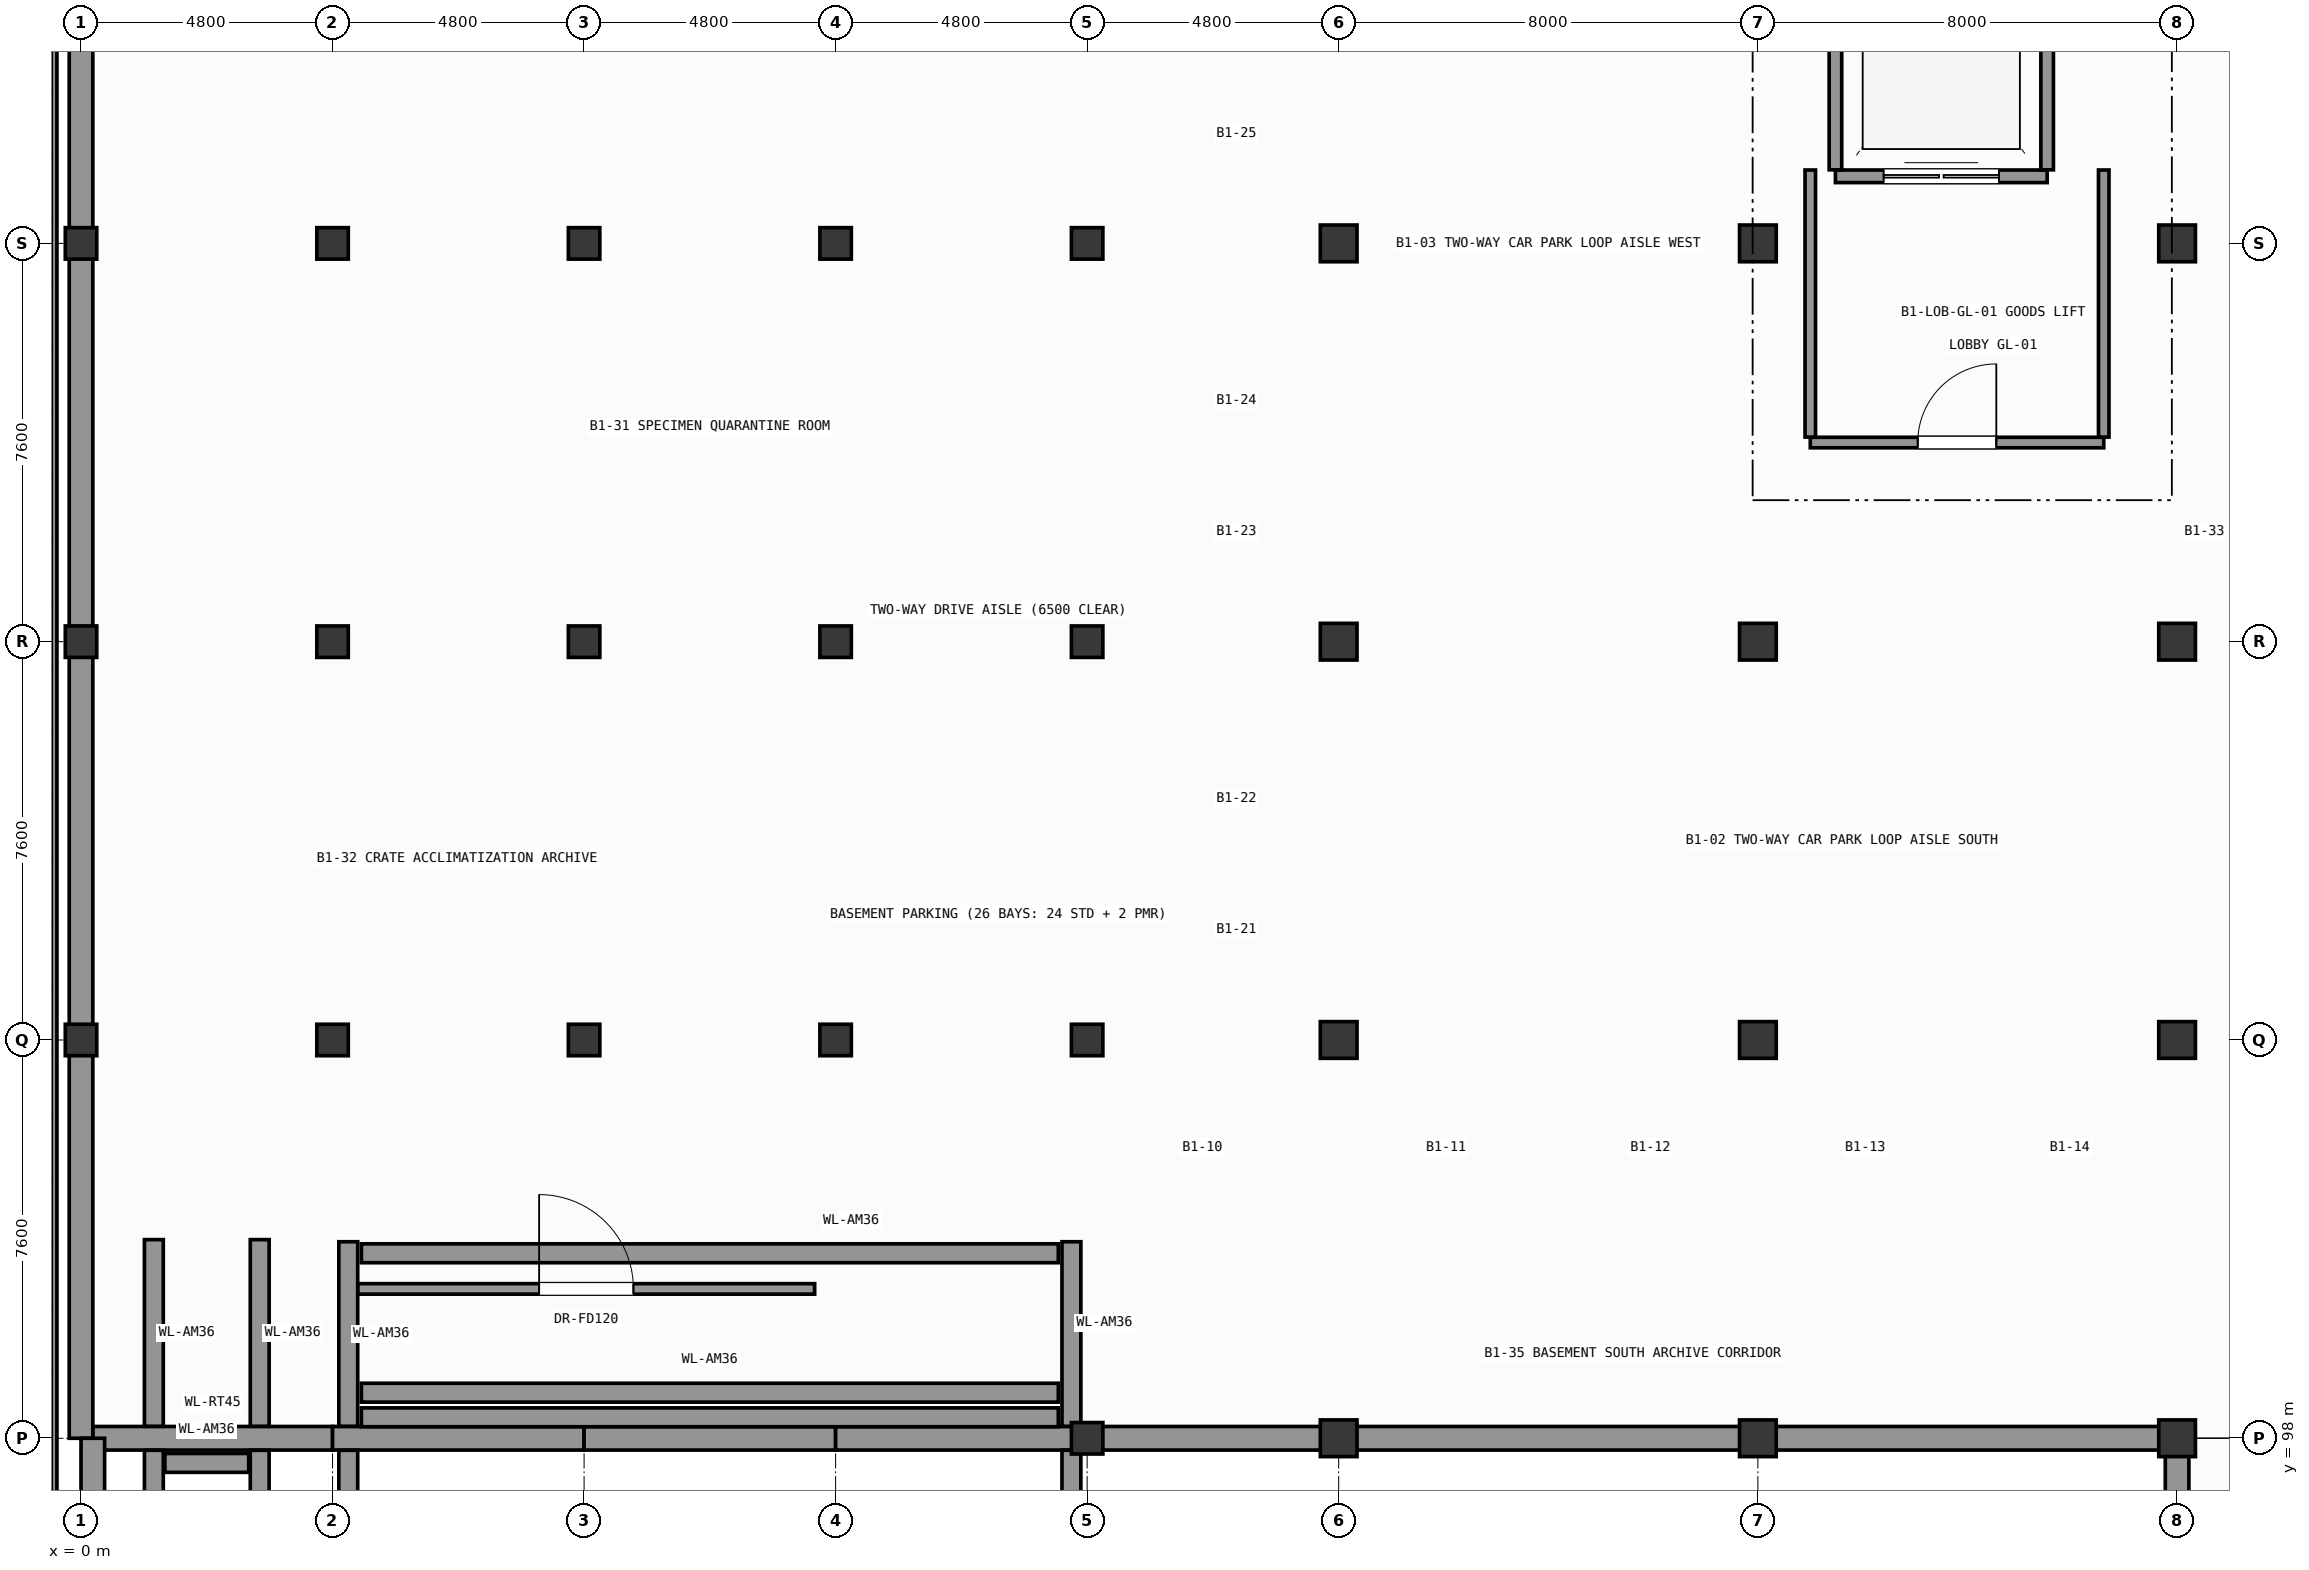
"""IFC4 building model, lengths in metres.
Left out: names, types, materials, properties, quantities, classifications, styles, units other than length and angle.
Written with IfcOpenShell. Run it as: python <this file> out.ifc"""

import sys

from ifc_helpers import new_model, si_unit, direction, frame, frame_2d, origin, origin_2d, place, context, subcontext, project, spatial, polyline, rectangle, outline, extrude, element, fill, save


model = new_model("IFC4")
c1 = context("Model", 3, precision=1e-05, world=origin(), true_north=direction((0.0, 1.0)))
c2 = subcontext(c1, "Body", "Model", "MODEL_VIEW")
j1 = project(units=[si_unit("LENGTHUNIT", "METRE"), si_unit("PLANEANGLEUNIT", "RADIAN")], contexts=[c1])
p1 = place(None, origin())
s1 = spatial("IfcSite", under=j1, at=p1, CompositionType="ELEMENT")
p2 = place(p1, origin())
s2 = spatial("IfcBuilding", under=s1, at=p2, CompositionType="ELEMENT")
p3 = place(p2, frame((0.0, 0.0, -4.8)))
s3 = spatial("IfcBuildingStorey", under=s2, at=p3, CompositionType="ELEMENT", Elevation=-4.8)
for number, where, z_axis, x_axis in (
    (1, (0.0, 105.6, 0.0), (0.0, 0.0, 1.0), (1.0, 0.0, 0.0)),
    (2, (0.0, 113.2, 0.0), (0.0, 0.0, 1.0), (1.0, 0.0, 0.0)),
    (3, (0.0, 120.8, 0.0), (0.0, 0.0, 1.0), (1.0, 0.0, 0.0)),
    (4, (4.8, 105.6, 0.0), (0.0, 0.0, 1.0), (1.0, 0.0, 0.0)),
    (5, (4.8, 113.2, 0.0), (0.0, 0.0, 1.0), (1.0, 0.0, 0.0)),
    (6, (4.8, 120.8, 0.0), (0.0, 0.0, 1.0), (1.0, 0.0, 0.0)),
    (7, (9.6, 105.6, 0.0), (0.0, 0.0, 1.0), (1.0, 0.0, 0.0)),
    (8, (9.6, 113.2, 0.0), (0.0, 0.0, 1.0), (1.0, 0.0, 0.0)),
    (9, (9.6, 120.8, 0.0), (0.0, 0.0, 1.0), (1.0, 0.0, 0.0)),
    (10, (14.4, 105.6, 0.0), (0.0, 0.0, 1.0), (1.0, 0.0, 0.0)),
    (11, (14.4, 113.2, 0.0), (0.0, 0.0, 1.0), (1.0, 0.0, 0.0)),
    (12, (14.4, 120.8, 0.0), (0.0, 0.0, 1.0), (1.0, 0.0, 0.0)),
    (13, (19.2, 98.0, 0.0), (0.0, 0.0, 1.0), (1.0, 0.0, 0.0)),
    (14, (19.2, 105.6, 0.0), (0.0, 0.0, 1.0), (1.0, 0.0, 0.0)),
    (15, (19.2, 113.2, 0.0), (0.0, 0.0, 1.0), (1.0, 0.0, 0.0)),
    (16, (19.2, 120.8, 0.0), (0.0, 0.0, 1.0), (1.0, 0.0, 0.0)),
):
    element("IfcColumn", number, at=place(p3, frame(where, z_axis=z_axis, x_axis=x_axis)), inside=s3, PredefinedType="COLUMN", context=c2, shape_type="SweptSolid", body=[
        extrude(rectangle(XDim=0.6, YDim=0.6, at=origin_2d()), origin(), (0.0, 0.0, 1.0), 4.8),
    ])
for number, where, z_axis, x_axis in (
    (17, (24.0, 98.0, 0.0), (0.0, 0.0, 1.0), (1.0, 0.0, 0.0)),
    (18, (24.0, 105.6, 0.0), (0.0, 0.0, 1.0), (1.0, 0.0, 0.0)),
    (19, (24.0, 113.2, 0.0), (0.0, 0.0, 1.0), (1.0, 0.0, 0.0)),
    (20, (24.0, 120.8, 0.0), (0.0, 0.0, 1.0), (1.0, 0.0, 0.0)),
    (21, (32.0, 98.0, 0.0), (0.0, 0.0, 1.0), (1.0, 0.0, 0.0)),
    (22, (32.0, 105.6, 0.0), (0.0, 0.0, 1.0), (1.0, 0.0, 0.0)),
    (23, (32.0, 113.2, 0.0), (0.0, 0.0, 1.0), (1.0, 0.0, 0.0)),
    (24, (32.0, 120.8, 0.0), (0.0, 0.0, 1.0), (1.0, 0.0, 0.0)),
    (25, (40.0, 98.0, 0.0), (0.0, 0.0, 1.0), (1.0, 0.0, 0.0)),
    (26, (40.0, 105.6, 0.0), (0.0, 0.0, 1.0), (1.0, 0.0, 0.0)),
    (27, (40.0, 113.2, 0.0), (0.0, 0.0, 1.0), (1.0, 0.0, 0.0)),
    (28, (40.0, 120.8, 0.0), (0.0, 0.0, 1.0), (1.0, 0.0, 0.0)),
):
    element("IfcColumn", number, at=place(p3, frame(where, z_axis=z_axis, x_axis=x_axis)), inside=s3, PredefinedType="COLUMN", context=c2, shape_type="SweptSolid", body=[
        extrude(rectangle(XDim=0.7, YDim=0.7, at=origin_2d()), origin(), (0.0, 0.0, 1.0), 4.8),
    ])
p4 = place(p3, frame((0.0, 120.8, 0.0), z_axis=(0.0, 0.0, 1.0), x_axis=(0.0, 1.0, 0.0)))
e29 = element("IfcWall", 29, at=p4, inside=s3, PredefinedType="USERDEFINED", context=c2, shape_type="SweptSolid", body=[
    extrude(rectangle(XDim=7.6, YDim=0.45, at=frame_2d((3.8, 0.0))), origin(), (0.0, 0.0, 1.0), 4.5),
])
p5 = place(p4, frame((4.9, 0.0, 0.0)))
e30 = element("IfcOpeningElement", 30, at=p5, cuts=e29, PredefinedType="OPENING", context=c2, shape_type="SweptSolid", body=[
    extrude(rectangle(XDim=1.8, YDim=2.4, at=frame_2d((0.9, 1.2))), frame((0.0, 0.235, 0.0), z_axis=(0.0, -1.0, 0.0), x_axis=(1.0, 0.0, 0.0)), (0.0, 0.0, 1.0), 0.47),
])
p6 = place(p3, frame((0.0, 113.2, 0.0), z_axis=(0.0, 0.0, 1.0), x_axis=(0.0, 1.0, 0.0)))
e31 = element("IfcWall", 31, at=p6, inside=s3, PredefinedType="USERDEFINED", context=c2, shape_type="SweptSolid", body=[
    extrude(rectangle(XDim=7.6, YDim=0.45, at=frame_2d((3.8, 0.0))), origin(), (0.0, 0.0, 1.0), 4.5),
])
p7 = place(p3, frame((0.0, 105.6, 0.0), z_axis=(0.0, 0.0, 1.0), x_axis=(0.0, 1.0, 0.0)))
e32 = element("IfcWall", 32, at=p7, inside=s3, PredefinedType="USERDEFINED", context=c2, shape_type="SweptSolid", body=[
    extrude(rectangle(XDim=7.6, YDim=0.45, at=frame_2d((3.8, 0.0))), origin(), (0.0, 0.0, 1.0), 4.5),
])
p8 = place(p3, frame((0.0, 98.0, 0.0), z_axis=(0.0, 0.0, 1.0), x_axis=(0.0, 1.0, 0.0)))
e33 = element("IfcWall", 33, at=p8, inside=s3, PredefinedType="USERDEFINED", context=c2, shape_type="SweptSolid", body=[
    extrude(rectangle(XDim=7.6, YDim=0.45, at=frame_2d((3.8, 0.0))), origin(), (0.0, 0.0, 1.0), 4.5),
])
p9 = place(p3, frame((4.8, 98.0, 0.0), z_axis=(0.0, 0.0, 1.0), x_axis=(-1.0, 0.0, 0.0)))
e34 = element("IfcWall", 34, at=p9, inside=s3, PredefinedType="USERDEFINED", context=c2, shape_type="SweptSolid", body=[
    extrude(rectangle(XDim=4.571, YDim=0.45, at=frame_2d((2.286, 0.0))), origin(), (0.0, 0.0, 1.0), 4.5),
])
p10 = place(p3, frame((9.6, 98.0, 0.0), z_axis=(0.0, 0.0, 1.0), x_axis=(-1.0, 0.0, 0.0)))
e35 = element("IfcWall", 35, at=p10, inside=s3, PredefinedType="USERDEFINED", context=c2, shape_type="SweptSolid", body=[
    extrude(rectangle(XDim=4.8, YDim=0.45, at=frame_2d((2.4, 0.0))), origin(), (0.0, 0.0, 1.0), 4.5),
])
p11 = place(p3, frame((14.4, 98.0, 0.0), z_axis=(0.0, 0.0, 1.0), x_axis=(-1.0, 0.0, 0.0)))
e36 = element("IfcWall", 36, at=p11, inside=s3, PredefinedType="USERDEFINED", context=c2, shape_type="SweptSolid", body=[
    extrude(rectangle(XDim=4.8, YDim=0.45, at=frame_2d((2.4, 0.0))), origin(), (0.0, 0.0, 1.0), 4.5),
])
for number, where, z_axis, x_axis in (
    (37, (19.2, 98.0, 0.0), (0.0, 0.0, 1.0), (-1.0, 0.0, 0.0)),
    (38, (24.0, 98.0, 0.0), (0.0, 0.0, 1.0), (-1.0, 0.0, 0.0)),
):
    element("IfcWall", number, at=place(p3, frame(where, z_axis=z_axis, x_axis=x_axis)), inside=s3, PredefinedType="USERDEFINED", context=c2, shape_type="SweptSolid", body=[
        extrude(rectangle(XDim=4.8, YDim=0.45, at=frame_2d((2.4, 0.0))), origin(), (0.0, 0.0, 1.0), 4.5),
    ])
for number, where, z_axis, x_axis in (
    (39, (32.0, 98.0, 0.0), (0.0, 0.0, 1.0), (-1.0, 0.0, 0.0)),
    (40, (40.0, 98.0, 0.0), (0.0, 0.0, 1.0), (-1.0, 0.0, 0.0)),
):
    element("IfcWall", number, at=place(p3, frame(where, z_axis=z_axis, x_axis=x_axis)), inside=s3, PredefinedType="USERDEFINED", context=c2, shape_type="SweptSolid", body=[
        extrude(rectangle(XDim=8.0, YDim=0.45, at=frame_2d((4.0, 0.0))), origin(), (0.0, 0.0, 1.0), 4.5),
    ])
p12 = place(p3, frame((40.0, 90.4, 0.0), z_axis=(0.0, 0.0, 1.0), x_axis=(0.0, 1.0, 0.0)))
e41 = element("IfcWall", 41, at=p12, inside=s3, PredefinedType="USERDEFINED", context=c2, shape_type="SweptSolid", body=[
    extrude(rectangle(XDim=7.371, YDim=0.45, at=frame_2d((3.686, 0.0))), origin(), (0.0, 0.0, 1.0), 4.5),
])
p13 = place(p3, frame((0.225, 98.0, 0.0), z_axis=(0.0, 0.0, 1.0), x_axis=(0.0, -1.0, 0.0)))
e42 = element("IfcWall", 42, at=p13, inside=s3, PredefinedType="SOLIDWALL", context=c2, shape_type="SweptSolid", body=[
    extrude(rectangle(XDim=7.6, YDim=0.45, at=frame_2d((3.8, 0.0))), origin(), (0.0, 0.0, 1.0), 4.5),
])
p14 = place(p3, frame((1.39, 86.2, 0.0), z_axis=(0.0, 0.0, 1.0), x_axis=(0.0, 1.0, 0.0)))
e43 = element("IfcWall", 43, at=p14, inside=s3, PredefinedType="SOLIDWALL", context=c2, shape_type="SweptSolid", body=[
    extrude(rectangle(XDim=11.571, YDim=0.36, at=frame_2d((5.786, 0.0))), origin(), (0.0, 0.0, 1.0), 4.8),
])
p15 = place(p3, frame((1.39, 98.229, 0.0), z_axis=(0.0, 0.0, 1.0), x_axis=(0.0, 1.0, 0.0)))
e44 = element("IfcWall", 44, at=p15, inside=s3, PredefinedType="SOLIDWALL", context=c2, shape_type="SweptSolid", body=[
    extrude(rectangle(XDim=3.561, YDim=0.36, at=frame_2d((1.781, 0.0))), origin(), (0.0, 0.0, 1.0), 4.8),
])
p16 = place(p3, frame((3.41, 86.2, 0.0), z_axis=(0.0, 0.0, 1.0), x_axis=(0.0, 1.0, 0.0)))
e45 = element("IfcWall", 45, at=p16, inside=s3, PredefinedType="SOLIDWALL", context=c2, shape_type="SweptSolid", body=[
    extrude(rectangle(XDim=11.571, YDim=0.36, at=frame_2d((5.786, 0.0))), origin(), (0.0, 0.0, 1.0), 4.8),
])
p17 = place(p3, frame((3.41, 98.229, 0.0), z_axis=(0.0, 0.0, 1.0), x_axis=(0.0, 1.0, 0.0)))
e46 = element("IfcWall", 46, at=p17, inside=s3, PredefinedType="SOLIDWALL", context=c2, shape_type="SweptSolid", body=[
    extrude(rectangle(XDim=3.561, YDim=0.36, at=frame_2d((1.781, 0.0))), origin(), (0.0, 0.0, 1.0), 4.8),
])
p18 = place(p3, frame((1.6, 97.53, 0.0), z_axis=(0.0, 0.0, 1.0), x_axis=(1.0, 0.0, 0.0)))
e47 = element("IfcWall", 47, at=p18, inside=s3, PredefinedType="SOLIDWALL", context=c2, shape_type="SweptSolid", body=[
    extrude(rectangle(XDim=1.6, YDim=0.36, at=frame_2d((0.8, 0.0))), origin(), (0.0, 0.0, 1.0), 4.8),
])
p19 = place(p3, frame((5.1, 86.25, 0.0), z_axis=(0.0, 0.0, 1.0), x_axis=(0.0, 1.0, 0.0)))
e48 = element("IfcWall", 48, at=p19, inside=s3, PredefinedType="SOLIDWALL", context=c2, shape_type="SweptSolid", body=[
    extrude(rectangle(XDim=11.521, YDim=0.36, at=frame_2d((5.76, 0.0))), origin(), (0.0, 0.0, 1.0), 4.8),
])
p20 = place(p3, frame((5.1, 98.229, 0.0), z_axis=(0.0, 0.0, 1.0), x_axis=(0.0, 1.0, 0.0)))
e49 = element("IfcWall", 49, at=p20, inside=s3, PredefinedType="SOLIDWALL", context=c2, shape_type="SweptSolid", body=[
    extrude(rectangle(XDim=3.521, YDim=0.36, at=frame_2d((1.76, 0.0))), origin(), (0.0, 0.0, 1.0), 4.8),
])
p21 = place(p3, frame((18.9, 86.25, 0.0), z_axis=(0.0, 0.0, 1.0), x_axis=(0.0, 1.0, 0.0)))
e50 = element("IfcWall", 50, at=p21, inside=s3, PredefinedType="SOLIDWALL", context=c2, shape_type="SweptSolid", body=[
    extrude(rectangle(XDim=11.521, YDim=0.36, at=frame_2d((5.76, 0.0))), origin(), (0.0, 0.0, 1.0), 4.8),
])
p22 = place(p3, frame((18.9, 98.229, 0.0), z_axis=(0.0, 0.0, 1.0), x_axis=(0.0, 1.0, 0.0)))
e51 = element("IfcWall", 51, at=p22, inside=s3, PredefinedType="SOLIDWALL", context=c2, shape_type="SweptSolid", body=[
    extrude(rectangle(XDim=3.521, YDim=0.36, at=frame_2d((1.76, 0.0))), origin(), (0.0, 0.0, 1.0), 4.8),
])
for number, where, z_axis, x_axis in (
    (52, (5.35, 98.87, 0.0), (0.0, 0.0, 1.0), (1.0, 0.0, 0.0)),
    (53, (5.35, 101.53, 0.0), (0.0, 0.0, 1.0), (1.0, 0.0, 0.0)),
    (54, (5.35, 98.4, 0.0), (0.0, 0.0, 1.0), (1.0, 0.0, 0.0)),
):
    element("IfcWall", number, at=place(p3, frame(where, z_axis=z_axis, x_axis=x_axis)), inside=s3, PredefinedType="SOLIDWALL", context=c2, shape_type="SweptSolid", body=[
        extrude(rectangle(XDim=13.3, YDim=0.36, at=frame_2d((6.65, 0.0))), origin(), (0.0, 0.0, 1.0), 4.8),
    ])
p23 = place(p3, frame((-0.685, 89.0, -0.3), z_axis=(0.0, 0.0, 1.0), x_axis=(0.0, 1.0, 0.0)))
e55 = element("IfcWall", 55, at=p23, inside=s3, PredefinedType="USERDEFINED", context=c2, shape_type="SweptSolid", body=[
    extrude(outline(polyline([(0.0, 0.0), (35.8, 0.0), (35.8, 0.05), (0.0, 4.8), (0.0, 0.0)])), frame((0.0, 0.225, 0.0), z_axis=(0.0, -1.0, 0.0), x_axis=(1.0, 0.0, 0.0)), (0.0, 0.0, 1.0), 0.45),
])
p24 = place(p3, frame((33.48, 122.08, 0.0), z_axis=(0.0, 0.0, 1.0), x_axis=(1.0, 0.0, 0.0)))
e56 = element("IfcWall", 56, at=p24, inside=s3, PredefinedType="SHEAR", context=c2, shape_type="SweptSolid", body=[
    extrude(rectangle(XDim=4.04, YDim=0.24, at=frame_2d((2.02, 0.0))), origin(), (0.0, 0.0, 1.0), 4.5),
])
p25 = place(p24, frame((0.92, 0.0, 0.0)))
e57 = element("IfcOpeningElement", 57, at=p25, cuts=e56, PredefinedType="OPENING", context=c2, shape_type="SweptSolid", body=[
    extrude(rectangle(XDim=2.2, YDim=2.6, at=frame_2d((1.1, 1.3))), frame((0.0, 0.13, 0.0), z_axis=(0.0, -1.0, 0.0), x_axis=(1.0, 0.0, 0.0)), (0.0, 0.0, 1.0), 0.26),
])
for number, where, z_axis, x_axis in (
    (58, (33.48, 122.204, 0.0), (0.0, 0.0, 1.0), (0.0, 1.0, 0.0)),
    (59, (37.52, 122.204, 0.0), (0.0, 0.0, 1.0), (0.0, 1.0, 0.0)),
):
    element("IfcWall", number, at=place(p3, frame(where, z_axis=z_axis, x_axis=x_axis)), inside=s3, PredefinedType="SHEAR", context=c2, shape_type="SweptSolid", body=[
        extrude(rectangle(XDim=4.992, YDim=0.24, at=frame_2d((2.496, 0.0))), origin(), (0.0, 0.0, 1.0), 4.5),
    ])
p26 = place(p3, frame((33.0, 117.0, 0.0), z_axis=(0.0, 0.0, 1.0), x_axis=(1.0, 0.0, 0.0)))
e60 = element("IfcWall", 60, at=p26, inside=s3, PredefinedType="PARTITIONING", context=c2, shape_type="SweptSolid", body=[
    extrude(rectangle(XDim=5.6, YDim=0.2, at=frame_2d((2.8, 0.0))), origin(), (0.0, 0.0, 1.0), 4.5),
])
p27 = place(p26, frame((2.05, 0.0, 0.0)))
e61 = element("IfcOpeningElement", 61, at=p27, cuts=e60, PredefinedType="OPENING", context=c2, shape_type="SweptSolid", body=[
    extrude(rectangle(XDim=1.5, YDim=2.2, at=frame_2d((0.75, 1.1))), frame((0.0, 0.11, 0.0), z_axis=(0.0, -1.0, 0.0), x_axis=(1.0, 0.0, 0.0)), (0.0, 0.0, 1.0), 0.22),
])
for number, where, z_axis, x_axis in (
    (62, (33.0, 117.104, 0.0), (0.0, 0.0, 1.0), (0.0, 1.0, 0.0)),
    (63, (38.6, 117.104, 0.0), (0.0, 0.0, 1.0), (0.0, 1.0, 0.0)),
):
    element("IfcWall", number, at=place(p3, frame(where, z_axis=z_axis, x_axis=x_axis)), inside=s3, PredefinedType="PARTITIONING", context=c2, shape_type="SweptSolid", body=[
        extrude(rectangle(XDim=5.096, YDim=0.2, at=frame_2d((2.548, 0.0))), origin(), (0.0, 0.0, 1.0), 4.5),
    ])
p28 = place(p3, frame((5.284, 100.85, 0.0), z_axis=(0.0, 0.0, 1.0), x_axis=(1.0, 0.0, 0.0)))
e64 = element("IfcWall", 64, at=p28, inside=s3, PredefinedType="PARTITIONING", context=c2, shape_type="SweptSolid", body=[
    extrude(rectangle(XDim=8.716, YDim=0.2, at=frame_2d((4.358, 0.0))), origin(), (0.0, 0.0, 1.0), 4.5),
])
p29 = place(p28, frame((3.458, 0.0, 0.0)))
e65 = element("IfcOpeningElement", 65, at=p29, cuts=e64, PredefinedType="OPENING", context=c2, shape_type="SweptSolid", body=[
    extrude(rectangle(XDim=1.8, YDim=2.4, at=frame_2d((0.9, 1.2))), frame((0.0, 0.11, 0.0), z_axis=(0.0, -1.0, 0.0), x_axis=(1.0, 0.0, 0.0)), (0.0, 0.0, 1.0), 0.22),
])
p30 = place(p25, origin())
e66 = element("IfcDoor", 66, at=p30, inside=s3, OperationType="DOUBLE_DOOR_SLIDING", PredefinedType="DOOR", context=c2, shape_type="SweptSolid", body=[
    extrude(rectangle(XDim=2.2, YDim=2.6, at=frame_2d((1.1, 1.3))), frame((0.0, 0.025, 0.0), z_axis=(0.0, -1.0, 0.0), x_axis=(1.0, 0.0, 0.0)), (0.0, 0.0, 1.0), 0.05),
])
fill(e57, e66)
p31 = place(p27, origin())
e67 = element("IfcDoor", 67, at=p31, inside=s3, OperationType="SINGLE_SWING_RIGHT", PredefinedType="DOOR", context=c2, shape_type="SweptSolid", body=[
    extrude(rectangle(XDim=1.5, YDim=2.2, at=frame_2d((0.75, 1.1))), frame((0.0, 0.025, 0.0), z_axis=(0.0, -1.0, 0.0), x_axis=(1.0, 0.0, 0.0)), (0.0, 0.0, 1.0), 0.05),
])
fill(e61, e67)
p32 = place(p29, origin())
e68 = element("IfcDoor", 68, at=p32, inside=s3, OperationType="SINGLE_SWING_LEFT", PredefinedType="DOOR", context=c2, shape_type="SweptSolid", body=[
    extrude(rectangle(XDim=1.8, YDim=2.4, at=frame_2d((0.9, 1.2))), frame((0.0, 0.025, 0.0), z_axis=(0.0, -1.0, 0.0), x_axis=(1.0, 0.0, 0.0)), (0.0, 0.0, 1.0), 0.05),
])
fill(e65, e68)
save(model, sys.argv[1])
